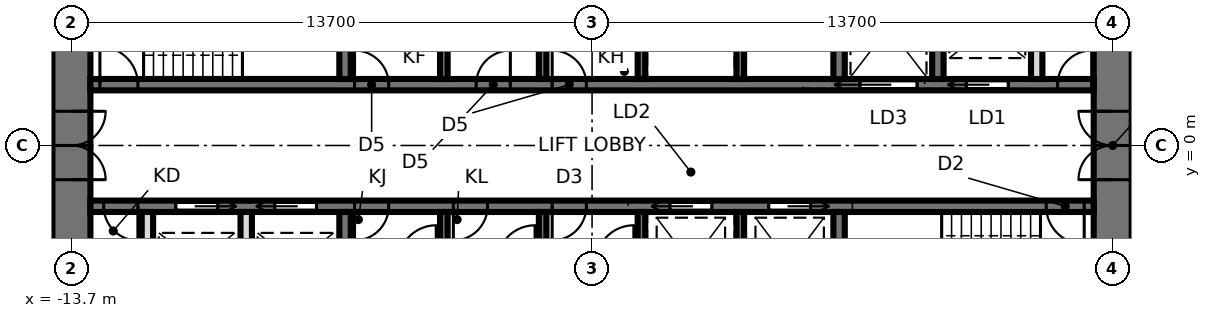
"""IFC4 building model, lengths in metres.
Left out: names, types, materials, properties, quantities, classifications, styles, units other than length and angle.
Written with IfcOpenShell. Run it as: python <this file> out.ifc"""

import sys

from ifc_helpers import new_model, si_unit, direction, frame, frame_2d, origin, place, context, subcontext, project, spatial, rectangle, extrude, element, fill, save


model = new_model("IFC4")
c1 = context("Model", 3, precision=1e-05, world=origin(), true_north=direction((0.0, 1.0)))
c2 = subcontext(c1, "Body", "Model", "MODEL_VIEW")
j1 = project(units=[si_unit("LENGTHUNIT", "METRE"), si_unit("PLANEANGLEUNIT", "RADIAN")], contexts=[c1])
p1 = place(None, origin())
s1 = spatial("IfcSite", under=j1, at=p1, CompositionType="ELEMENT")
p2 = place(p1, origin())
s2 = spatial("IfcBuilding", under=s1, at=p2, CompositionType="ELEMENT")
p3 = place(p2, frame((0.0, 0.0, 172.1)))
s3 = spatial("IfcBuildingStorey", under=s2, at=p3, CompositionType="ELEMENT", Elevation=172.1)
p4 = place(p3, frame((13.7, -9.5, 0.0), z_axis=(0.0, 0.0, 1.0), x_axis=(0.0, 1.0, 0.0)))
e1 = element("IfcWall", 1, at=p4, inside=s3, PredefinedType="SHEAR", context=c2, shape_type="SweptSolid", body=[
    extrude(rectangle(XDim=19.0, YDim=1.0, at=frame_2d((9.5, 0.0))), origin(), (0.0, 0.0, 1.0), 3.9),
])
p5 = place(p4, frame((8.6, 0.0, 0.0)))
e2 = element("IfcOpeningElement", 2, at=p5, cuts=e1, PredefinedType="OPENING", context=c2, shape_type="SweptSolid", body=[
    extrude(rectangle(XDim=1.8, YDim=2.4, at=frame_2d((0.9, 1.2))), frame((0.0, 0.51, 0.0), z_axis=(0.0, -1.0, 0.0), x_axis=(1.0, 0.0, 0.0)), (0.0, 0.0, 1.0), 1.02),
])
p6 = place(p3, frame((-13.7, 9.5, 0.0), z_axis=(0.0, 0.0, 1.0), x_axis=(0.0, -1.0, 0.0)))
e3 = element("IfcWall", 3, at=p6, inside=s3, PredefinedType="SHEAR", context=c2, shape_type="SweptSolid", body=[
    extrude(rectangle(XDim=19.0, YDim=1.0, at=frame_2d((9.5, 0.0))), origin(), (0.0, 0.0, 1.0), 3.9),
])
p7 = place(p6, frame((8.6, 0.0, 0.0)))
e4 = element("IfcOpeningElement", 4, at=p7, cuts=e3, PredefinedType="OPENING", context=c2, shape_type="SweptSolid", body=[
    extrude(rectangle(XDim=1.8, YDim=2.4, at=frame_2d((0.9, 1.2))), frame((0.0, 0.51, 0.0), z_axis=(0.0, -1.0, 0.0), x_axis=(1.0, 0.0, 0.0)), (0.0, 0.0, 1.0), 1.02),
])
p8 = place(p3, frame((-13.2, 1.6, 0.0), z_axis=(0.0, 0.0, 1.0), x_axis=(1.0, 0.0, 0.0)))
e5 = element("IfcWall", 5, at=p8, inside=s3, PredefinedType="SHEAR", context=c2, shape_type="SweptSolid", body=[
    extrude(rectangle(XDim=26.4, YDim=0.3, at=frame_2d((13.2, 0.0))), origin(), (0.0, 0.0, 1.0), 3.9),
])
p9 = place(p8, frame((0.25, 0.0, 0.0)))
e6 = element("IfcOpeningElement", 6, at=p9, cuts=e5, PredefinedType="OPENING", context=c2, shape_type="SweptSolid", body=[
    extrude(rectangle(XDim=1.0, YDim=2.1, at=frame_2d((0.5, 1.05))), frame((0.0, 0.16, 0.0), z_axis=(0.0, -1.0, 0.0), x_axis=(1.0, 0.0, 0.0)), (0.0, 0.0, 1.0), 0.32),
])
p10 = place(p8, frame((23.05, 0.0, 0.0)))
e7 = element("IfcOpeningElement", 7, at=p10, cuts=e5, PredefinedType="OPENING", context=c2, shape_type="SweptSolid", body=[
    extrude(rectangle(XDim=1.1, YDim=2.3, at=frame_2d((0.55, 1.15))), frame((0.0, 0.16, 0.0), z_axis=(0.0, -1.0, 0.0), x_axis=(1.0, 0.0, 0.0)), (0.0, 0.0, 1.0), 0.32),
])
p11 = place(p8, frame((20.25, 0.0, 0.0)))
e8 = element("IfcOpeningElement", 8, at=p11, cuts=e5, PredefinedType="OPENING", context=c2, shape_type="SweptSolid", body=[
    extrude(rectangle(XDim=1.5, YDim=2.4, at=frame_2d((0.75, 1.2))), frame((0.0, 0.16, 0.0), z_axis=(0.0, -1.0, 0.0), x_axis=(1.0, 0.0, 0.0)), (0.0, 0.0, 1.0), 0.32),
])
p12 = place(p8, frame((6.95, 0.0, 0.0)))
e9 = element("IfcOpeningElement", 9, at=p12, cuts=e5, PredefinedType="OPENING", context=c2, shape_type="SweptSolid", body=[
    extrude(rectangle(XDim=0.9, YDim=2.1, at=frame_2d((0.45, 1.05))), frame((0.0, 0.16, 0.0), z_axis=(0.0, -1.0, 0.0), x_axis=(1.0, 0.0, 0.0)), (0.0, 0.0, 1.0), 0.32),
])
p13 = place(p8, frame((10.15, 0.0, 0.0)))
e10 = element("IfcOpeningElement", 10, at=p13, cuts=e5, PredefinedType="OPENING", context=c2, shape_type="SweptSolid", body=[
    extrude(rectangle(XDim=0.9, YDim=2.1, at=frame_2d((0.45, 1.05))), frame((0.0, 0.16, 0.0), z_axis=(0.0, -1.0, 0.0), x_axis=(1.0, 0.0, 0.0)), (0.0, 0.0, 1.0), 0.32),
])
p14 = place(p8, frame((12.15, 0.0, 0.0)))
e11 = element("IfcOpeningElement", 11, at=p14, cuts=e5, PredefinedType="OPENING", context=c2, shape_type="SweptSolid", body=[
    extrude(rectangle(XDim=0.9, YDim=2.1, at=frame_2d((0.45, 1.05))), frame((0.0, 0.16, 0.0), z_axis=(0.0, -1.0, 0.0), x_axis=(1.0, 0.0, 0.0)), (0.0, 0.0, 1.0), 0.32),
])
p15 = place(p8, frame((25.45, 0.0, 0.0)))
e12 = element("IfcOpeningElement", 12, at=p15, cuts=e5, PredefinedType="OPENING", context=c2, shape_type="SweptSolid", body=[
    extrude(rectangle(XDim=0.9, YDim=2.1, at=frame_2d((0.45, 1.05))), frame((0.0, 0.16, 0.0), z_axis=(0.0, -1.0, 0.0), x_axis=(1.0, 0.0, 0.0)), (0.0, 0.0, 1.0), 0.32),
])
p16 = place(p3, frame((-13.2, -1.6, 0.0), z_axis=(0.0, 0.0, 1.0), x_axis=(1.0, 0.0, 0.0)))
e13 = element("IfcWall", 13, at=p16, inside=s3, PredefinedType="SHEAR", context=c2, shape_type="SweptSolid", body=[
    extrude(rectangle(XDim=26.4, YDim=0.3, at=frame_2d((13.2, 0.0))), origin(), (0.0, 0.0, 1.0), 3.9),
])
p17 = place(p16, frame((25.15, 0.0, 0.0)))
e14 = element("IfcOpeningElement", 14, at=p17, cuts=e13, PredefinedType="OPENING", context=c2, shape_type="SweptSolid", body=[
    extrude(rectangle(XDim=1.0, YDim=2.1, at=frame_2d((0.5, 1.05))), frame((0.0, 0.16, 0.0), z_axis=(0.0, -1.0, 0.0), x_axis=(1.0, 0.0, 0.0)), (0.0, 0.0, 1.0), 0.32),
])
p18 = place(p16, frame((6.95, 0.0, 0.0)))
e15 = element("IfcOpeningElement", 15, at=p18, cuts=e13, PredefinedType="OPENING", context=c2, shape_type="SweptSolid", body=[
    extrude(rectangle(XDim=0.9, YDim=2.1, at=frame_2d((0.45, 1.05))), frame((0.0, 0.16, 0.0), z_axis=(0.0, -1.0, 0.0), x_axis=(1.0, 0.0, 0.0)), (0.0, 0.0, 1.0), 0.32),
])
p19 = place(p16, frame((9.55, 0.0, 0.0)))
e16 = element("IfcOpeningElement", 16, at=p19, cuts=e13, PredefinedType="OPENING", context=c2, shape_type="SweptSolid", body=[
    extrude(rectangle(XDim=0.9, YDim=2.1, at=frame_2d((0.45, 1.05))), frame((0.0, 0.16, 0.0), z_axis=(0.0, -1.0, 0.0), x_axis=(1.0, 0.0, 0.0)), (0.0, 0.0, 1.0), 0.32),
])
p20 = place(p16, frame((12.15, 0.0, 0.0)))
e17 = element("IfcOpeningElement", 17, at=p20, cuts=e13, PredefinedType="OPENING", context=c2, shape_type="SweptSolid", body=[
    extrude(rectangle(XDim=0.9, YDim=2.1, at=frame_2d((0.45, 1.05))), frame((0.0, 0.16, 0.0), z_axis=(0.0, -1.0, 0.0), x_axis=(1.0, 0.0, 0.0)), (0.0, 0.0, 1.0), 0.32),
])
p21 = place(p16, frame((15.25, 0.0, 0.0)))
e18 = element("IfcOpeningElement", 18, at=p21, cuts=e13, PredefinedType="OPENING", context=c2, shape_type="SweptSolid", body=[
    extrude(rectangle(XDim=1.1, YDim=2.3, at=frame_2d((0.55, 1.15))), frame((0.0, 0.16, 0.0), z_axis=(0.0, -1.0, 0.0), x_axis=(1.0, 0.0, 0.0)), (0.0, 0.0, 1.0), 0.32),
])
p22 = place(p16, frame((17.85, 0.0, 0.0)))
e19 = element("IfcOpeningElement", 19, at=p22, cuts=e13, PredefinedType="OPENING", context=c2, shape_type="SweptSolid", body=[
    extrude(rectangle(XDim=1.1, YDim=2.3, at=frame_2d((0.55, 1.15))), frame((0.0, 0.16, 0.0), z_axis=(0.0, -1.0, 0.0), x_axis=(1.0, 0.0, 0.0)), (0.0, 0.0, 1.0), 0.32),
])
p23 = place(p16, frame((4.85, 0.0, 0.0)))
e20 = element("IfcOpeningElement", 20, at=p23, cuts=e13, PredefinedType="OPENING", context=c2, shape_type="SweptSolid", body=[
    extrude(rectangle(XDim=1.1, YDim=2.3, at=frame_2d((0.55, 1.15))), frame((0.0, 0.16, 0.0), z_axis=(0.0, -1.0, 0.0), x_axis=(1.0, 0.0, 0.0)), (0.0, 0.0, 1.0), 0.32),
])
p24 = place(p16, frame((2.25, 0.0, 0.0)))
e21 = element("IfcOpeningElement", 21, at=p24, cuts=e13, PredefinedType="OPENING", context=c2, shape_type="SweptSolid", body=[
    extrude(rectangle(XDim=1.1, YDim=2.3, at=frame_2d((0.55, 1.15))), frame((0.0, 0.16, 0.0), z_axis=(0.0, -1.0, 0.0), x_axis=(1.0, 0.0, 0.0)), (0.0, 0.0, 1.0), 0.32),
])
p25 = place(p16, frame((0.35, 0.0, 0.0)))
e22 = element("IfcOpeningElement", 22, at=p25, cuts=e13, PredefinedType="OPENING", context=c2, shape_type="SweptSolid", body=[
    extrude(rectangle(XDim=0.9, YDim=2.1, at=frame_2d((0.45, 1.05))), frame((0.0, 0.16, 0.0), z_axis=(0.0, -1.0, 0.0), x_axis=(1.0, 0.0, 0.0)), (0.0, 0.0, 1.0), 0.32),
])
for number, where, z_axis, x_axis in (
    (23, (-6.5, 1.75, 0.0), (0.0, 0.0, 1.0), (0.0, 1.0, 0.0)),
    (24, (6.5, 1.75, 0.0), (0.0, 0.0, 1.0), (0.0, 1.0, 0.0)),
):
    element("IfcWall", number, at=place(p3, frame(where, z_axis=z_axis, x_axis=x_axis)), inside=s3, PredefinedType="SHEAR", context=c2, shape_type="SweptSolid", body=[
        extrude(rectangle(XDim=2.7, YDim=0.3, at=frame_2d((1.35, 0.0))), origin(), (0.0, 0.0, 1.0), 3.9),
    ])
for number, where, z_axis, x_axis in (
    (25, (-3.9, 1.75, 0.0), (0.0, 0.0, 1.0), (0.0, 1.0, 0.0)),
    (26, (-1.3, 1.75, 0.0), (0.0, 0.0, 1.0), (0.0, 1.0, 0.0)),
    (27, (1.3, 1.75, 0.0), (0.0, 0.0, 1.0), (0.0, 1.0, 0.0)),
    (28, (3.9, 1.75, 0.0), (0.0, 0.0, 1.0), (0.0, 1.0, 0.0)),
):
    element("IfcWall", number, at=place(p3, frame(where, z_axis=z_axis, x_axis=x_axis)), inside=s3, PredefinedType="SHEAR", context=c2, shape_type="SweptSolid", body=[
        extrude(rectangle(XDim=2.7, YDim=0.2, at=frame_2d((1.35, 0.0))), origin(), (0.0, 0.0, 1.0), 3.9),
    ])
for number, where, z_axis, x_axis in (
    (29, (-6.5, -1.75, 0.0), (0.0, 0.0, 1.0), (0.0, -1.0, 0.0)),
    (30, (6.5, -1.75, 0.0), (0.0, 0.0, 1.0), (0.0, -1.0, 0.0)),
):
    element("IfcWall", number, at=place(p3, frame(where, z_axis=z_axis, x_axis=x_axis)), inside=s3, PredefinedType="SHEAR", context=c2, shape_type="SweptSolid", body=[
        extrude(rectangle(XDim=2.7, YDim=0.3, at=frame_2d((1.35, 0.0))), origin(), (0.0, 0.0, 1.0), 3.9),
    ])
for number, where, z_axis, x_axis in (
    (31, (-3.9, -1.75, 0.0), (0.0, 0.0, 1.0), (0.0, -1.0, 0.0)),
    (32, (-1.3, -1.75, 0.0), (0.0, 0.0, 1.0), (0.0, -1.0, 0.0)),
    (33, (1.3, -1.75, 0.0), (0.0, 0.0, 1.0), (0.0, -1.0, 0.0)),
    (34, (3.9, -1.75, 0.0), (0.0, 0.0, 1.0), (0.0, -1.0, 0.0)),
):
    element("IfcWall", number, at=place(p3, frame(where, z_axis=z_axis, x_axis=x_axis)), inside=s3, PredefinedType="SHEAR", context=c2, shape_type="SweptSolid", body=[
        extrude(rectangle(XDim=2.7, YDim=0.2, at=frame_2d((1.35, 0.0))), origin(), (0.0, 0.0, 1.0), 3.9),
    ])
p26 = place(p3, frame((9.1, 1.75, 0.0), z_axis=(0.0, 0.0, 1.0), x_axis=(0.0, 1.0, 0.0)))
e35 = element("IfcWall", 35, at=p26, inside=s3, PredefinedType="SHEAR", context=c2, shape_type="SweptSolid", body=[
    extrude(rectangle(XDim=2.7, YDim=0.3, at=frame_2d((1.35, 0.0))), origin(), (0.0, 0.0, 1.0), 3.9),
])
for number, where, z_axis, x_axis in (
    (36, (-9.1, -1.75, 0.0), (0.0, 0.0, 1.0), (0.0, -1.0, 0.0)),
    (37, (-11.7, -1.75, 0.0), (0.0, 0.0, 1.0), (0.0, -1.0, 0.0)),
    (38, (11.7, 1.75, 0.0), (0.0, 0.0, 1.0), (0.0, 1.0, 0.0)),
):
    element("IfcWall", number, at=place(p3, frame(where, z_axis=z_axis, x_axis=x_axis)), inside=s3, PredefinedType="SOLIDWALL", context=c2, shape_type="SweptSolid", body=[
        extrude(rectangle(XDim=2.7, YDim=0.3, at=frame_2d((1.35, 0.0))), origin(), (0.0, 0.0, 1.0), 3.74),
    ])
p27 = place(p7, origin())
e39 = element("IfcDoor", 39, at=p27, inside=s3, OperationType="DOUBLE_DOOR_SINGLE_SWING", PredefinedType="DOOR", context=c2, shape_type="SweptSolid", body=[
    extrude(rectangle(XDim=1.72, YDim=2.36, at=frame_2d((0.9, 1.18))), frame((0.0, 0.025, 0.0), z_axis=(0.0, -1.0, 0.0), x_axis=(1.0, 0.0, 0.0)), (0.0, 0.0, 1.0), 0.05),
    extrude(rectangle(XDim=0.04, YDim=2.4, at=frame_2d((0.02, 1.2))), frame((0.0, 0.25, 0.0), z_axis=(0.0, -1.0, 0.0), x_axis=(1.0, 0.0, 0.0)), (0.0, 0.0, 1.0), 0.5),
    extrude(rectangle(XDim=0.04, YDim=2.4, at=frame_2d((1.78, 1.2))), frame((0.0, 0.25, 0.0), z_axis=(0.0, -1.0, 0.0), x_axis=(1.0, 0.0, 0.0)), (0.0, 0.0, 1.0), 0.5),
    extrude(rectangle(XDim=1.72, YDim=0.04, at=frame_2d((0.9, 2.38))), frame((0.0, 0.25, 0.0), z_axis=(0.0, -1.0, 0.0), x_axis=(1.0, 0.0, 0.0)), (0.0, 0.0, 1.0), 0.5),
])
fill(e4, e39)
p28 = place(p5, origin())
e40 = element("IfcDoor", 40, at=p28, inside=s3, OperationType="DOUBLE_DOOR_SINGLE_SWING", PredefinedType="DOOR", context=c2, shape_type="SweptSolid", body=[
    extrude(rectangle(XDim=1.72, YDim=2.36, at=frame_2d((0.9, 1.18))), frame((0.0, 0.025, 0.0), z_axis=(0.0, -1.0, 0.0), x_axis=(1.0, 0.0, 0.0)), (0.0, 0.0, 1.0), 0.05),
    extrude(rectangle(XDim=0.04, YDim=2.4, at=frame_2d((0.02, 1.2))), frame((0.0, 0.25, 0.0), z_axis=(0.0, -1.0, 0.0), x_axis=(1.0, 0.0, 0.0)), (0.0, 0.0, 1.0), 0.5),
    extrude(rectangle(XDim=0.04, YDim=2.4, at=frame_2d((1.78, 1.2))), frame((0.0, 0.25, 0.0), z_axis=(0.0, -1.0, 0.0), x_axis=(1.0, 0.0, 0.0)), (0.0, 0.0, 1.0), 0.5),
    extrude(rectangle(XDim=1.72, YDim=0.04, at=frame_2d((0.9, 2.38))), frame((0.0, 0.25, 0.0), z_axis=(0.0, -1.0, 0.0), x_axis=(1.0, 0.0, 0.0)), (0.0, 0.0, 1.0), 0.5),
])
fill(e2, e40)
p29 = place(p9, origin())
e41 = element("IfcDoor", 41, at=p29, inside=s3, OperationType="SINGLE_SWING_LEFT", PredefinedType="DOOR", context=c2, shape_type="SweptSolid", body=[
    extrude(rectangle(XDim=1.0, YDim=2.1, at=frame_2d((0.5, 1.05))), frame((0.0, 0.025, 0.0), z_axis=(0.0, -1.0, 0.0), x_axis=(1.0, 0.0, 0.0)), (0.0, 0.0, 1.0), 0.05),
])
fill(e6, e41)
p30 = place(p17, frame((1.0, 0.0, 0.0), z_axis=(0.0, 0.0, 1.0), x_axis=(-1.0, 0.0, 0.0)))
e42 = element("IfcDoor", 42, at=p30, inside=s3, OperationType="SINGLE_SWING_LEFT", PredefinedType="DOOR", context=c2, shape_type="SweptSolid", body=[
    extrude(rectangle(XDim=1.0, YDim=2.1, at=frame_2d((0.5, 1.05))), frame((0.0, 0.025, 0.0), z_axis=(0.0, -1.0, 0.0), x_axis=(1.0, 0.0, 0.0)), (0.0, 0.0, 1.0), 0.05),
])
fill(e14, e42)
p31 = place(p10, origin())
e43 = element("IfcDoor", 43, at=p31, inside=s3, OperationType="SLIDING_TO_LEFT", PredefinedType="DOOR", context=c2, shape_type="SweptSolid", body=[
    extrude(rectangle(XDim=1.1, YDim=2.3, at=frame_2d((0.55, 1.15))), frame((0.0, 0.025, 0.0), z_axis=(0.0, -1.0, 0.0), x_axis=(1.0, 0.0, 0.0)), (0.0, 0.0, 1.0), 0.05),
])
fill(e7, e43)
p32 = place(p11, origin())
e44 = element("IfcDoor", 44, at=p32, inside=s3, OperationType="SLIDING_TO_LEFT", PredefinedType="DOOR", context=c2, shape_type="SweptSolid", body=[
    extrude(rectangle(XDim=1.5, YDim=2.4, at=frame_2d((0.75, 1.2))), frame((0.0, 0.025, 0.0), z_axis=(0.0, -1.0, 0.0), x_axis=(1.0, 0.0, 0.0)), (0.0, 0.0, 1.0), 0.05),
])
fill(e8, e44)
p33 = place(p12, origin())
e45 = element("IfcDoor", 45, at=p33, inside=s3, OperationType="SINGLE_SWING_LEFT", PredefinedType="DOOR", context=c2, shape_type="SweptSolid", body=[
    extrude(rectangle(XDim=0.9, YDim=2.1, at=frame_2d((0.45, 1.05))), frame((0.0, 0.025, 0.0), z_axis=(0.0, -1.0, 0.0), x_axis=(1.0, 0.0, 0.0)), (0.0, 0.0, 1.0), 0.05),
])
fill(e9, e45)
p34 = place(p13, origin())
e46 = element("IfcDoor", 46, at=p34, inside=s3, OperationType="SINGLE_SWING_RIGHT", PredefinedType="DOOR", context=c2, shape_type="SweptSolid", body=[
    extrude(rectangle(XDim=0.9, YDim=2.1, at=frame_2d((0.45, 1.05))), frame((0.0, 0.025, 0.0), z_axis=(0.0, -1.0, 0.0), x_axis=(1.0, 0.0, 0.0)), (0.0, 0.0, 1.0), 0.05),
])
fill(e10, e46)
p35 = place(p14, origin())
e47 = element("IfcDoor", 47, at=p35, inside=s3, OperationType="SINGLE_SWING_LEFT", PredefinedType="DOOR", context=c2, shape_type="SweptSolid", body=[
    extrude(rectangle(XDim=0.9, YDim=2.1, at=frame_2d((0.45, 1.05))), frame((0.0, 0.025, 0.0), z_axis=(0.0, -1.0, 0.0), x_axis=(1.0, 0.0, 0.0)), (0.0, 0.0, 1.0), 0.05),
])
fill(e11, e47)
p36 = place(p18, frame((0.9, 0.0, 0.0), z_axis=(0.0, 0.0, 1.0), x_axis=(-1.0, 0.0, 0.0)))
e48 = element("IfcDoor", 48, at=p36, inside=s3, OperationType="SINGLE_SWING_RIGHT", PredefinedType="DOOR", context=c2, shape_type="SweptSolid", body=[
    extrude(rectangle(XDim=0.9, YDim=2.1, at=frame_2d((0.45, 1.05))), frame((0.0, 0.025, 0.0), z_axis=(0.0, -1.0, 0.0), x_axis=(1.0, 0.0, 0.0)), (0.0, 0.0, 1.0), 0.05),
])
fill(e15, e48)
p37 = place(p19, frame((0.9, 0.0, 0.0), z_axis=(0.0, 0.0, 1.0), x_axis=(-1.0, 0.0, 0.0)))
e49 = element("IfcDoor", 49, at=p37, inside=s3, OperationType="SINGLE_SWING_RIGHT", PredefinedType="DOOR", context=c2, shape_type="SweptSolid", body=[
    extrude(rectangle(XDim=0.9, YDim=2.1, at=frame_2d((0.45, 1.05))), frame((0.0, 0.025, 0.0), z_axis=(0.0, -1.0, 0.0), x_axis=(1.0, 0.0, 0.0)), (0.0, 0.0, 1.0), 0.05),
])
fill(e16, e49)
p38 = place(p20, frame((0.9, 0.0, 0.0), z_axis=(0.0, 0.0, 1.0), x_axis=(-1.0, 0.0, 0.0)))
e50 = element("IfcDoor", 50, at=p38, inside=s3, OperationType="SINGLE_SWING_RIGHT", PredefinedType="DOOR", context=c2, shape_type="SweptSolid", body=[
    extrude(rectangle(XDim=0.9, YDim=2.1, at=frame_2d((0.45, 1.05))), frame((0.0, 0.025, 0.0), z_axis=(0.0, -1.0, 0.0), x_axis=(1.0, 0.0, 0.0)), (0.0, 0.0, 1.0), 0.05),
])
fill(e17, e50)
p39 = place(p21, frame((1.1, 0.0, 0.0), z_axis=(0.0, 0.0, 1.0), x_axis=(-1.0, 0.0, 0.0)))
e51 = element("IfcDoor", 51, at=p39, inside=s3, OperationType="SLIDING_TO_RIGHT", PredefinedType="DOOR", context=c2, shape_type="SweptSolid", body=[
    extrude(rectangle(XDim=1.1, YDim=2.3, at=frame_2d((0.55, 1.15))), frame((0.0, 0.025, 0.0), z_axis=(0.0, -1.0, 0.0), x_axis=(1.0, 0.0, 0.0)), (0.0, 0.0, 1.0), 0.05),
])
fill(e18, e51)
p40 = place(p22, frame((1.1, 0.0, 0.0), z_axis=(0.0, 0.0, 1.0), x_axis=(-1.0, 0.0, 0.0)))
e52 = element("IfcDoor", 52, at=p40, inside=s3, OperationType="SLIDING_TO_LEFT", PredefinedType="DOOR", context=c2, shape_type="SweptSolid", body=[
    extrude(rectangle(XDim=1.1, YDim=2.3, at=frame_2d((0.55, 1.15))), frame((0.0, 0.025, 0.0), z_axis=(0.0, -1.0, 0.0), x_axis=(1.0, 0.0, 0.0)), (0.0, 0.0, 1.0), 0.05),
])
fill(e19, e52)
p41 = place(p23, frame((1.1, 0.0, 0.0), z_axis=(0.0, 0.0, 1.0), x_axis=(-1.0, 0.0, 0.0)))
e53 = element("IfcDoor", 53, at=p41, inside=s3, OperationType="SLIDING_TO_RIGHT", PredefinedType="DOOR", context=c2, shape_type="SweptSolid", body=[
    extrude(rectangle(XDim=1.1, YDim=2.3, at=frame_2d((0.55, 1.15))), frame((0.0, 0.025, 0.0), z_axis=(0.0, -1.0, 0.0), x_axis=(1.0, 0.0, 0.0)), (0.0, 0.0, 1.0), 0.05),
])
fill(e20, e53)
p42 = place(p24, frame((1.1, 0.0, 0.0), z_axis=(0.0, 0.0, 1.0), x_axis=(-1.0, 0.0, 0.0)))
e54 = element("IfcDoor", 54, at=p42, inside=s3, OperationType="SLIDING_TO_LEFT", PredefinedType="DOOR", context=c2, shape_type="SweptSolid", body=[
    extrude(rectangle(XDim=1.1, YDim=2.3, at=frame_2d((0.55, 1.15))), frame((0.0, 0.025, 0.0), z_axis=(0.0, -1.0, 0.0), x_axis=(1.0, 0.0, 0.0)), (0.0, 0.0, 1.0), 0.05),
])
fill(e21, e54)
p43 = place(p15, origin())
e55 = element("IfcDoor", 55, at=p43, inside=s3, OperationType="SINGLE_SWING_RIGHT", PredefinedType="DOOR", context=c2, shape_type="SweptSolid", body=[
    extrude(rectangle(XDim=0.9, YDim=2.1, at=frame_2d((0.45, 1.05))), frame((0.0, 0.025, 0.0), z_axis=(0.0, -1.0, 0.0), x_axis=(1.0, 0.0, 0.0)), (0.0, 0.0, 1.0), 0.05),
])
fill(e12, e55)
p44 = place(p25, frame((0.9, 0.0, 0.0), z_axis=(0.0, 0.0, 1.0), x_axis=(-1.0, 0.0, 0.0)))
e56 = element("IfcDoor", 56, at=p44, inside=s3, OperationType="SINGLE_SWING_LEFT", PredefinedType="DOOR", context=c2, shape_type="SweptSolid", body=[
    extrude(rectangle(XDim=0.9, YDim=2.1, at=frame_2d((0.45, 1.05))), frame((0.0, 0.025, 0.0), z_axis=(0.0, -1.0, 0.0), x_axis=(1.0, 0.0, 0.0)), (0.0, 0.0, 1.0), 0.05),
])
fill(e22, e56)
save(model, sys.argv[1])
